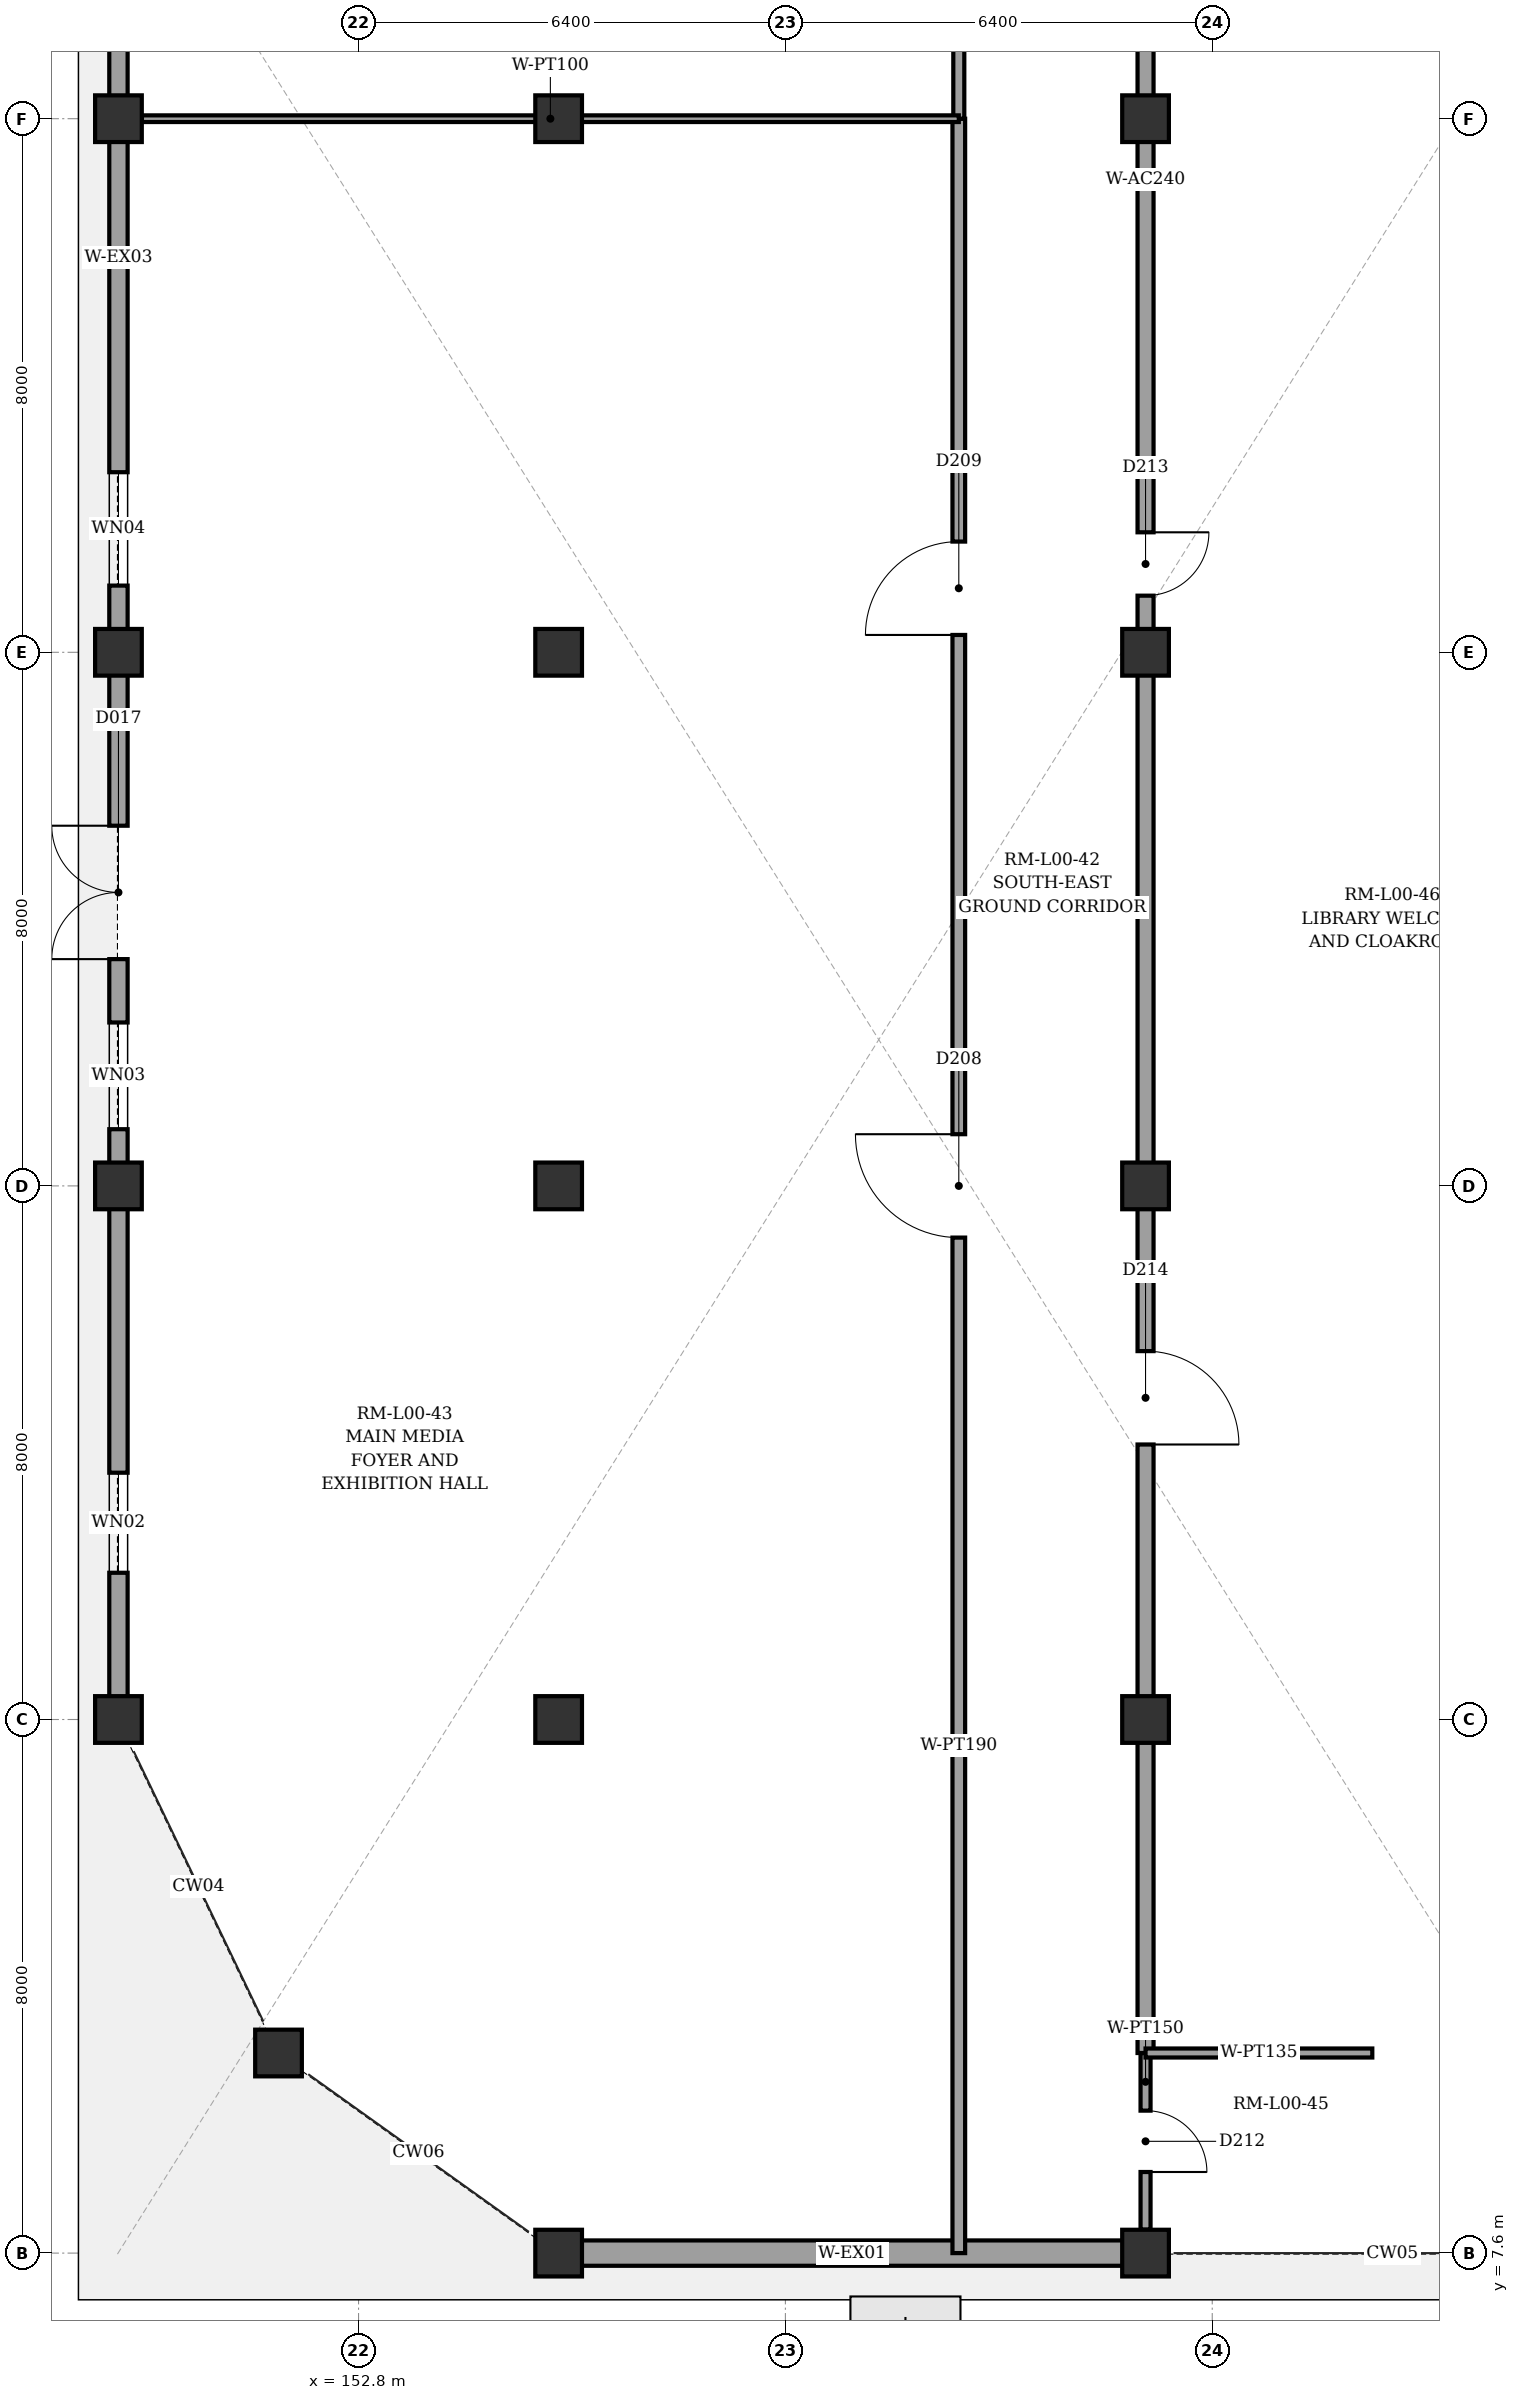
"""IFC4 building model, lengths in metres.
Left out: names, types, materials, properties, quantities, classifications, styles, units other than length and angle.
Written with IfcOpenShell. Run it as: python <this file> out.ifc"""

import sys

from ifc_helpers import new_model, si_unit, direction, frame, frame_2d, origin, origin_2d, place, context, subcontext, project, spatial, rectangle, extrude, element, fill, save


model = new_model("IFC4")
c1 = context("Model", 3, precision=1e-05, world=origin(), true_north=direction((0.0, 1.0)))
c2 = subcontext(c1, "Body", "Model", "MODEL_VIEW")
j1 = project(units=[si_unit("LENGTHUNIT", "METRE"), si_unit("PLANEANGLEUNIT", "RADIAN")], contexts=[c1])
p1 = place(None, origin())
s1 = spatial("IfcSite", under=j1, at=p1, CompositionType="ELEMENT")
p2 = place(p1, origin())
s2 = spatial("IfcBuilding", under=s1, at=p2, CompositionType="ELEMENT")
p3 = place(p2, origin())
s3 = spatial("IfcBuildingStorey", under=s2, at=p3, CompositionType="ELEMENT", Elevation=0.0)
for number, where, z_axis, x_axis in (
    (1, (149.2, 15.6, 0.0), (0.0, 0.0, 1.0), (1.0, 0.0, 0.0)),
    (2, (149.2, 23.6, 0.0), (0.0, 0.0, 1.0), (1.0, 0.0, 0.0)),
    (3, (149.2, 31.6, 0.0), (0.0, 0.0, 1.0), (1.0, 0.0, 0.0)),
    (4, (149.2, 39.6, 0.0), (0.0, 0.0, 1.0), (1.0, 0.0, 0.0)),
    (5, (151.6, 10.6, 0.0), (0.0, 0.0, 1.0), (1.0, 0.0, 0.0)),
    (6, (155.8, 7.6, 0.0), (0.0, 0.0, 1.0), (1.0, 0.0, 0.0)),
    (7, (155.8, 15.6, 0.0), (0.0, 0.0, 1.0), (1.0, 0.0, 0.0)),
    (8, (155.8, 23.6, 0.0), (0.0, 0.0, 1.0), (1.0, 0.0, 0.0)),
    (9, (155.8, 31.6, 0.0), (0.0, 0.0, 1.0), (1.0, 0.0, 0.0)),
    (10, (155.8, 39.6, 0.0), (0.0, 0.0, 1.0), (1.0, 0.0, 0.0)),
    (11, (164.6, 7.6, 0.0), (0.0, 0.0, 1.0), (1.0, 0.0, 0.0)),
    (12, (164.6, 15.6, 0.0), (0.0, 0.0, 1.0), (1.0, 0.0, 0.0)),
    (13, (164.6, 23.6, 0.0), (0.0, 0.0, 1.0), (1.0, 0.0, 0.0)),
    (14, (164.6, 31.6, 0.0), (0.0, 0.0, 1.0), (1.0, 0.0, 0.0)),
    (15, (164.6, 39.6, 0.0), (0.0, 0.0, 1.0), (1.0, 0.0, 0.0)),
):
    element("IfcColumn", number, at=place(p3, frame(where, z_axis=z_axis, x_axis=x_axis)), inside=s3, PredefinedType="COLUMN", context=c2, shape_type="SweptSolid", body=[
        extrude(rectangle(XDim=0.7, YDim=0.7, at=origin_2d()), origin(), (0.0, 0.0, 1.0), 5.4),
    ])
p4 = place(p3, frame((149.2, 15.6, 0.0), z_axis=(0.0, 0.0, 1.0), x_axis=(0.0, 1.0, 0.0)))
e16 = element("IfcWall", 16, at=p4, inside=s3, PredefinedType="SOLIDWALL", context=c2, shape_type="SweptSolid", body=[
    extrude(rectangle(XDim=48.0, YDim=0.275, at=frame_2d((24.0, 0.0))), origin(), (0.0, 0.0, 1.0), 4.29),
])
p5 = place(p4, frame((11.4, 0.0, 0.0)))
e17 = element("IfcOpeningElement", 17, at=p5, cuts=e16, PredefinedType="OPENING", context=c2, shape_type="SweptSolid", body=[
    extrude(rectangle(XDim=2.0, YDim=2.5, at=frame_2d((1.0, 1.25))), frame((0.0, 0.147, 0.0), z_axis=(0.0, -1.0, 0.0), x_axis=(1.0, 0.0, 0.0)), (0.0, 0.0, 1.0), 0.295),
])
p6 = place(p4, frame((2.2, 0.0, 0.8)))
e18 = element("IfcOpeningElement", 18, at=p6, cuts=e16, PredefinedType="OPENING", context=c2, shape_type="SweptSolid", body=[
    extrude(rectangle(XDim=1.5, YDim=2.1, at=frame_2d((0.75, 1.05))), frame((0.0, 0.147, 0.0), z_axis=(0.0, -1.0, 0.0), x_axis=(1.0, 0.0, 0.0)), (0.0, 0.0, 1.0), 0.295),
])
p7 = place(p4, frame((8.85, 0.0, 0.8)))
e19 = element("IfcOpeningElement", 19, at=p7, cuts=e16, PredefinedType="OPENING", context=c2, shape_type="SweptSolid", body=[
    extrude(rectangle(XDim=1.6, YDim=2.1, at=frame_2d((0.8, 1.05))), frame((0.0, 0.147, 0.0), z_axis=(0.0, -1.0, 0.0), x_axis=(1.0, 0.0, 0.0)), (0.0, 0.0, 1.0), 0.295),
])
p8 = place(p4, frame((17.0, 0.0, 0.8)))
e20 = element("IfcOpeningElement", 20, at=p8, cuts=e16, PredefinedType="OPENING", context=c2, shape_type="SweptSolid", body=[
    extrude(rectangle(XDim=1.7, YDim=2.15, at=frame_2d((0.85, 1.075))), frame((0.0, 0.147, 0.0), z_axis=(0.0, -1.0, 0.0), x_axis=(1.0, 0.0, 0.0)), (0.0, 0.0, 1.0), 0.295),
])
p9 = place(p4, frame((25.15, 0.0, 0.8)))
e21 = element("IfcOpeningElement", 21, at=p9, cuts=e16, PredefinedType="OPENING", context=c2, shape_type="SweptSolid", body=[
    extrude(rectangle(XDim=1.8, YDim=2.15, at=frame_2d((0.9, 1.075))), frame((0.0, 0.147, 0.0), z_axis=(0.0, -1.0, 0.0), x_axis=(1.0, 0.0, 0.0)), (0.0, 0.0, 1.0), 0.295),
])
p10 = place(p4, frame((33.25, 0.0, 0.8)))
e22 = element("IfcOpeningElement", 22, at=p10, cuts=e16, PredefinedType="OPENING", context=c2, shape_type="SweptSolid", body=[
    extrude(rectangle(XDim=1.9, YDim=2.2, at=frame_2d((0.95, 1.1))), frame((0.0, 0.147, 0.0), z_axis=(0.0, -1.0, 0.0), x_axis=(1.0, 0.0, 0.0)), (0.0, 0.0, 1.0), 0.295),
])
p11 = place(p4, frame((40.65, 0.0, 0.8)))
e23 = element("IfcOpeningElement", 23, at=p11, cuts=e16, PredefinedType="OPENING", context=c2, shape_type="SweptSolid", body=[
    extrude(rectangle(XDim=2.0, YDim=2.2, at=frame_2d((1.0, 1.1))), frame((0.0, 0.147, 0.0), z_axis=(0.0, -1.0, 0.0), x_axis=(1.0, 0.0, 0.0)), (0.0, 0.0, 1.0), 0.295),
])
p12 = place(p3, frame((164.6, 7.6, 0.0), z_axis=(0.0, 0.0, 1.0), x_axis=(-1.0, 0.0, 0.0)))
e24 = element("IfcWall", 24, at=p12, inside=s3, PredefinedType="SOLIDWALL", context=c2, shape_type="SweptSolid", body=[
    extrude(rectangle(XDim=8.8, YDim=0.38, at=frame_2d((4.4, 0.0))), origin(), (0.0, 0.0, 1.0), 4.29),
])
p13 = place(p3, frame((161.8, 7.6, 0.0), z_axis=(0.0, 0.0, 1.0), x_axis=(0.0, 1.0, 0.0)))
e25 = element("IfcWall", 25, at=p13, inside=s3, PredefinedType="PARTITIONING", context=c2, shape_type="SweptSolid", body=[
    extrude(rectangle(XDim=32.0, YDim=0.19, at=frame_2d((16.0, 0.0))), origin(), (0.0, 0.0, 1.0), 5.14),
])
p14 = place(p13, frame((15.225, 0.0, 0.0)))
e26 = element("IfcOpeningElement", 26, at=p14, cuts=e25, PredefinedType="OPENING", context=c2, shape_type="SweptSolid", body=[
    extrude(rectangle(XDim=1.55, YDim=2.25, at=frame_2d((0.775, 1.125))), frame((0.0, 0.105, 0.0), z_axis=(0.0, -1.0, 0.0), x_axis=(1.0, 0.0, 0.0)), (0.0, 0.0, 1.0), 0.21),
])
p15 = place(p13, frame((24.26, 0.0, 0.0)))
e27 = element("IfcOpeningElement", 27, at=p15, cuts=e25, PredefinedType="OPENING", context=c2, shape_type="SweptSolid", body=[
    extrude(rectangle(XDim=1.4, YDim=2.25, at=frame_2d((0.7, 1.125))), frame((0.0, 0.105, 0.0), z_axis=(0.0, -1.0, 0.0), x_axis=(1.0, 0.0, 0.0)), (0.0, 0.0, 1.0), 0.21),
])
p16 = place(p3, frame((161.8, 39.6, 0.0), z_axis=(0.0, 0.0, 1.0), x_axis=(0.0, 1.0, 0.0)))
e28 = element("IfcWall", 28, at=p16, inside=s3, PredefinedType="PARTITIONING", context=c2, shape_type="SweptSolid", body=[
    extrude(rectangle(XDim=24.0, YDim=0.165, at=frame_2d((12.0, 0.0))), origin(), (0.0, 0.0, 1.0), 5.14),
])
p17 = place(p16, frame((11.2, 0.0, 0.0)))
e29 = element("IfcOpeningElement", 29, at=p17, cuts=e28, PredefinedType="OPENING", context=c2, shape_type="SweptSolid", body=[
    extrude(rectangle(XDim=1.6, YDim=2.3, at=frame_2d((0.8, 1.15))), frame((0.0, 0.093, 0.0), z_axis=(0.0, -1.0, 0.0), x_axis=(1.0, 0.0, 0.0)), (0.0, 0.0, 1.0), 0.185),
])
p18 = place(p16, frame((17.92, 0.0, 0.0)))
e30 = element("IfcOpeningElement", 30, at=p18, cuts=e28, PredefinedType="OPENING", context=c2, shape_type="SweptSolid", body=[
    extrude(rectangle(XDim=1.6, YDim=2.3, at=frame_2d((0.8, 1.15))), frame((0.0, 0.093, 0.0), z_axis=(0.0, -1.0, 0.0), x_axis=(1.0, 0.0, 0.0)), (0.0, 0.0, 1.0), 0.185),
])
p19 = place(p3, frame((164.6, 10.6, 0.0), z_axis=(0.0, 0.0, 1.0), x_axis=(0.0, -1.0, 0.0)))
e31 = element("IfcWall", 31, at=p19, inside=s3, PredefinedType="PARTITIONING", context=c2, shape_type="SweptSolid", body=[
    extrude(rectangle(XDim=2.648, YDim=0.15, at=frame_2d((1.324, 0.0))), origin(), (0.0, 0.0, 1.0), 4.29),
])
p20 = place(p19, frame((0.864, 0.0, 0.0)))
e32 = element("IfcOpeningElement", 32, at=p20, cuts=e31, PredefinedType="OPENING", context=c2, shape_type="SweptSolid", body=[
    extrude(rectangle(XDim=0.92, YDim=2.1, at=frame_2d((0.46, 1.05))), frame((0.0, 0.085, 0.0), z_axis=(0.0, -1.0, 0.0), x_axis=(1.0, 0.0, 0.0)), (0.0, 0.0, 1.0), 0.17),
])
p21 = place(p3, frame((164.6, 55.248, 0.0), z_axis=(0.0, 0.0, 1.0), x_axis=(0.0, -1.0, 0.0)))
e33 = element("IfcWall", 33, at=p21, inside=s3, PredefinedType="PARTITIONING", context=c2, shape_type="SweptSolid", body=[
    extrude(rectangle(XDim=44.648, YDim=0.24, at=frame_2d((22.324, 0.0))), origin(), (0.0, 0.0, 1.0), 4.29),
])
p22 = place(p21, frame((21.849, 0.0, 0.0)))
e34 = element("IfcOpeningElement", 34, at=p22, cuts=e33, PredefinedType="OPENING", context=c2, shape_type="SweptSolid", body=[
    extrude(rectangle(XDim=0.95, YDim=2.1, at=frame_2d((0.475, 1.05))), frame((0.0, 0.13, 0.0), z_axis=(0.0, -1.0, 0.0), x_axis=(1.0, 0.0, 0.0)), (0.0, 0.0, 1.0), 0.26),
])
p23 = place(p21, frame((34.125, 0.0, 0.0)))
e35 = element("IfcOpeningElement", 35, at=p23, cuts=e33, PredefinedType="OPENING", context=c2, shape_type="SweptSolid", body=[
    extrude(rectangle(XDim=1.4, YDim=2.25, at=frame_2d((0.7, 1.125))), frame((0.0, 0.13, 0.0), z_axis=(0.0, -1.0, 0.0), x_axis=(1.0, 0.0, 0.0)), (0.0, 0.0, 1.0), 0.26),
])
p24 = place(p3, frame((149.552, 39.6, 0.0), z_axis=(0.0, 0.0, 1.0), x_axis=(1.0, 0.0, 0.0)))
e36 = element("IfcWall", 36, at=p24, inside=s3, PredefinedType="PARTITIONING", context=c2, shape_type="SweptSolid", body=[
    extrude(rectangle(XDim=12.248, YDim=0.1, at=frame_2d((6.124, 0.0))), origin(), (0.0, 0.0, 1.0), 4.29),
])
p25 = place(p3, frame((164.6, 10.6, 0.0), z_axis=(0.0, 0.0, 1.0), x_axis=(1.0, 0.0, 0.0)))
e37 = element("IfcWall", 37, at=p25, inside=s3, PredefinedType="PARTITIONING", context=c2, shape_type="SweptSolid", body=[
    extrude(rectangle(XDim=3.4, YDim=0.135, at=frame_2d((1.7, 0.0))), origin(), (0.0, 0.0, 1.0), 5.14),
])
p26 = place(p5, origin())
e38 = element("IfcDoor", 38, at=p26, inside=s3, OperationType="DOUBLE_SWING_LEFT", PredefinedType="DOOR", context=c2, shape_type="SweptSolid", body=[
    extrude(rectangle(XDim=2.0, YDim=2.5, at=frame_2d((1.0, 1.25))), frame((0.0, 0.025, 0.0), z_axis=(0.0, -1.0, 0.0), x_axis=(1.0, 0.0, 0.0)), (0.0, 0.0, 1.0), 0.05),
])
fill(e17, e38)
p27 = place(p6, origin())
e39 = element("IfcWindow", 39, at=p27, inside=s3, PartitioningType="SINGLE_PANEL", PredefinedType="WINDOW", context=c2, shape_type="SweptSolid", body=[
    extrude(rectangle(XDim=1.5, YDim=2.1, at=frame_2d((0.75, 1.05))), frame((0.0, 0.03, 0.0), z_axis=(0.0, -1.0, 0.0), x_axis=(1.0, 0.0, 0.0)), (0.0, 0.0, 1.0), 0.06),
])
fill(e18, e39)
p28 = place(p7, origin())
e40 = element("IfcWindow", 40, at=p28, inside=s3, PartitioningType="SINGLE_PANEL", PredefinedType="WINDOW", context=c2, shape_type="SweptSolid", body=[
    extrude(rectangle(XDim=1.6, YDim=2.1, at=frame_2d((0.8, 1.05))), frame((0.0, 0.03, 0.0), z_axis=(0.0, -1.0, 0.0), x_axis=(1.0, 0.0, 0.0)), (0.0, 0.0, 1.0), 0.06),
])
fill(e19, e40)
p29 = place(p8, origin())
e41 = element("IfcWindow", 41, at=p29, inside=s3, PartitioningType="SINGLE_PANEL", PredefinedType="WINDOW", context=c2, shape_type="SweptSolid", body=[
    extrude(rectangle(XDim=1.7, YDim=2.15, at=frame_2d((0.85, 1.075))), frame((0.0, 0.03, 0.0), z_axis=(0.0, -1.0, 0.0), x_axis=(1.0, 0.0, 0.0)), (0.0, 0.0, 1.0), 0.06),
])
fill(e20, e41)
p30 = place(p14, origin())
e42 = element("IfcDoor", 42, at=p30, inside=s3, OperationType="SINGLE_SWING_RIGHT", PredefinedType="DOOR", context=c2, shape_type="SweptSolid", body=[
    extrude(rectangle(XDim=1.55, YDim=2.25, at=frame_2d((0.775, 1.125))), frame((0.0, 0.025, 0.0), z_axis=(0.0, -1.0, 0.0), x_axis=(1.0, 0.0, 0.0)), (0.0, 0.0, 1.0), 0.05),
])
fill(e26, e42)
p31 = place(p15, origin())
e43 = element("IfcDoor", 43, at=p31, inside=s3, OperationType="SINGLE_SWING_LEFT", PredefinedType="DOOR", context=c2, shape_type="SweptSolid", body=[
    extrude(rectangle(XDim=1.4, YDim=2.25, at=frame_2d((0.7, 1.125))), frame((0.0, 0.025, 0.0), z_axis=(0.0, -1.0, 0.0), x_axis=(1.0, 0.0, 0.0)), (0.0, 0.0, 1.0), 0.05),
])
fill(e27, e43)
p32 = place(p20, origin())
e44 = element("IfcDoor", 44, at=p32, inside=s3, OperationType="SINGLE_SWING_RIGHT", PredefinedType="DOOR", context=c2, shape_type="SweptSolid", body=[
    extrude(rectangle(XDim=0.92, YDim=2.1, at=frame_2d((0.46, 1.05))), frame((0.0, 0.025, 0.0), z_axis=(0.0, -1.0, 0.0), x_axis=(1.0, 0.0, 0.0)), (0.0, 0.0, 1.0), 0.05),
])
fill(e32, e44)
p33 = place(p22, origin())
e45 = element("IfcDoor", 45, at=p33, inside=s3, OperationType="SINGLE_SWING_LEFT", PredefinedType="DOOR", context=c2, shape_type="SweptSolid", body=[
    extrude(rectangle(XDim=0.95, YDim=2.1, at=frame_2d((0.475, 1.05))), frame((0.0, 0.025, 0.0), z_axis=(0.0, -1.0, 0.0), x_axis=(1.0, 0.0, 0.0)), (0.0, 0.0, 1.0), 0.05),
])
fill(e34, e45)
p34 = place(p23, origin())
e46 = element("IfcDoor", 46, at=p34, inside=s3, OperationType="SINGLE_SWING_RIGHT", PredefinedType="DOOR", context=c2, shape_type="SweptSolid", body=[
    extrude(rectangle(XDim=1.4, YDim=2.25, at=frame_2d((0.7, 1.125))), frame((0.0, 0.025, 0.0), z_axis=(0.0, -1.0, 0.0), x_axis=(1.0, 0.0, 0.0)), (0.0, 0.0, 1.0), 0.05),
])
fill(e35, e46)
save(model, sys.argv[1])
